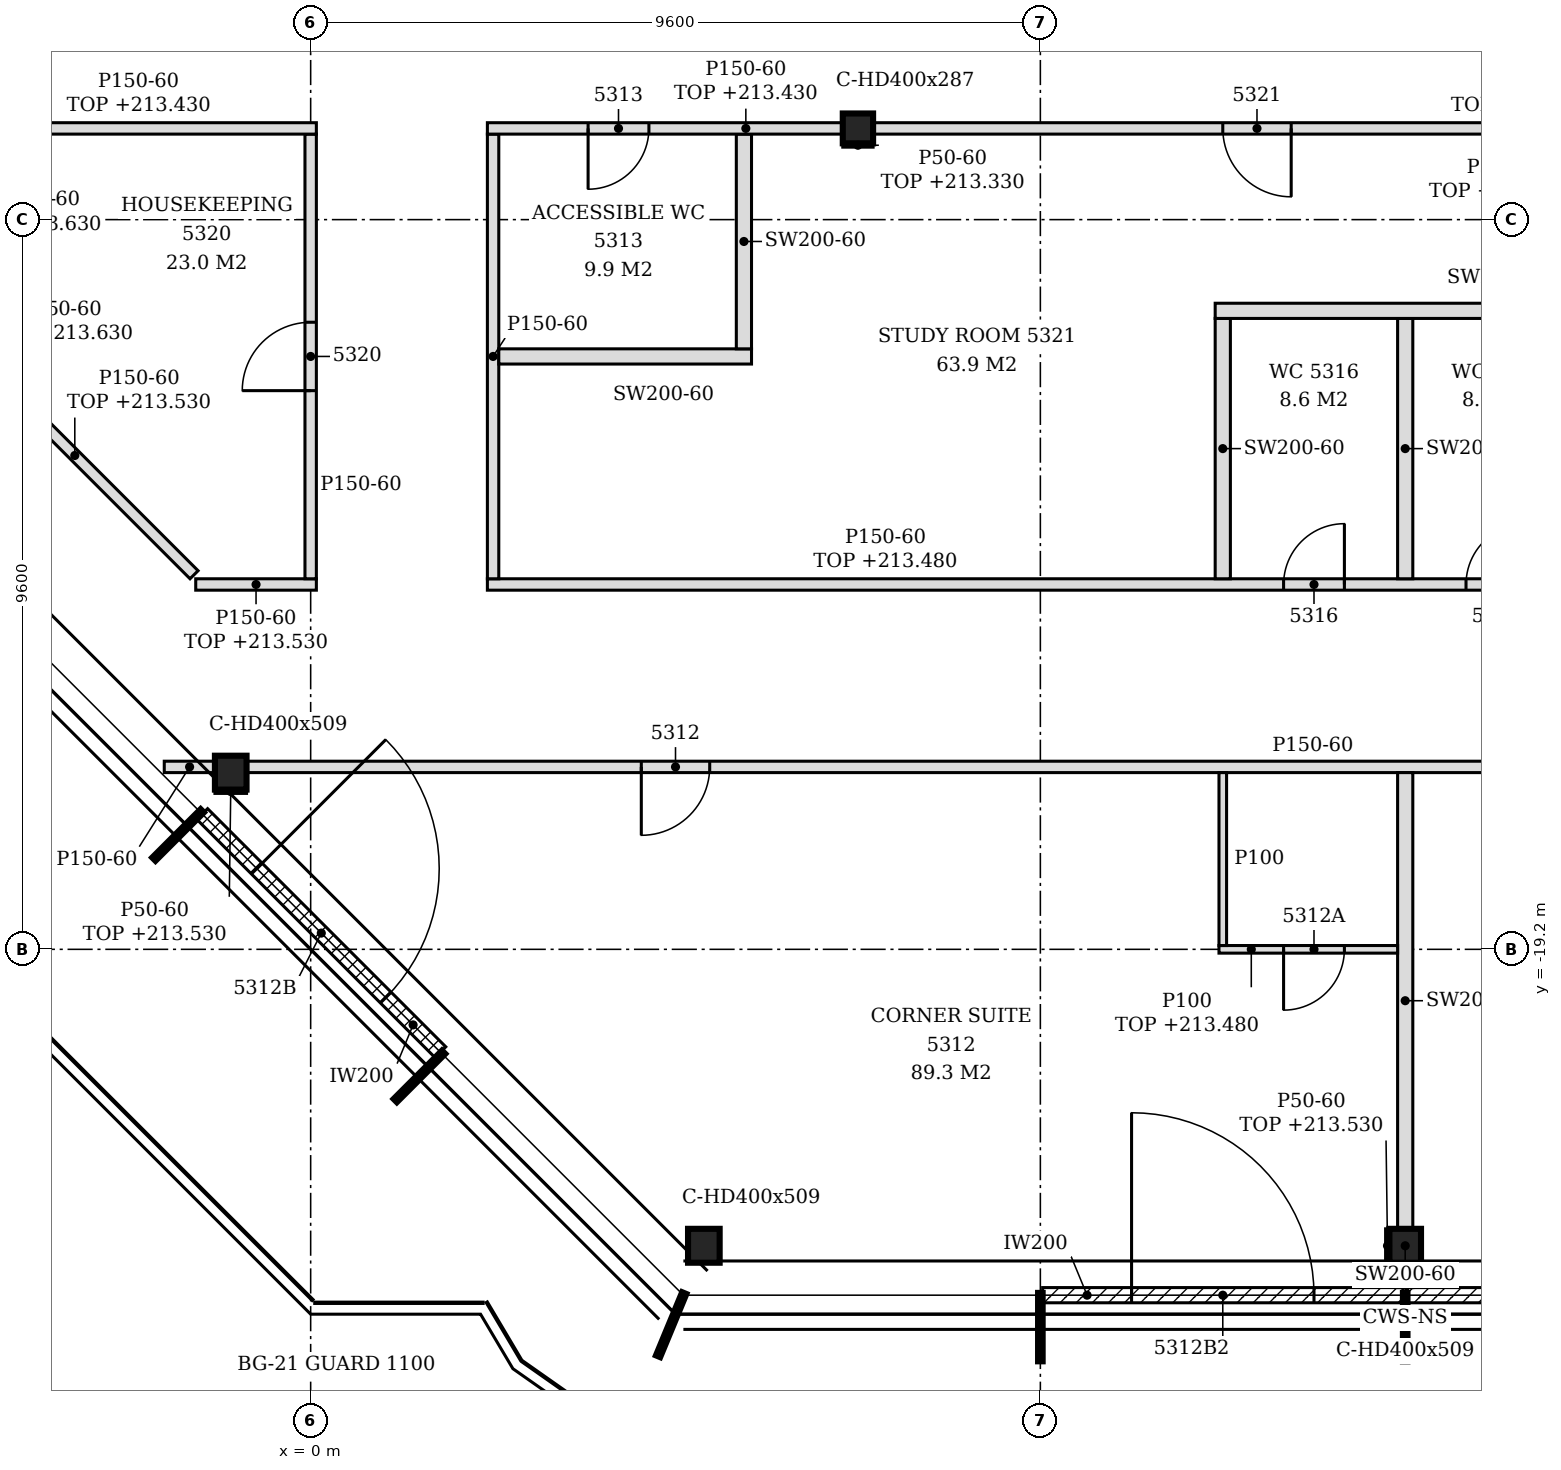
"""IFC4 building model, lengths in metres.
Left out: names, types, materials, properties, quantities, classifications, styles, units other than length and angle.
Written with IfcOpenShell. Run it as: python <this file> out.ifc"""

import sys

from ifc_helpers import new_model, si_unit, direction, frame, frame_2d, origin, origin_2d, place, context, subcontext, project, spatial, polyline, rectangle, i_section, outline, extrude, element, fill, save


model = new_model("IFC4")
c1 = context("Model", 3, precision=1e-05, world=origin(), true_north=direction((0.0, 1.0)))
c2 = subcontext(c1, "Body", "Model", "MODEL_VIEW")
j1 = project(units=[si_unit("LENGTHUNIT", "METRE"), si_unit("PLANEANGLEUNIT", "RADIAN")], contexts=[c1])
p1 = place(None, origin())
s1 = spatial("IfcSite", under=j1, at=p1, CompositionType="ELEMENT")
p2 = place(p1, origin())
s2 = spatial("IfcBuilding", under=s1, at=p2, CompositionType="ELEMENT")
p3 = place(p2, frame((0.0, 0.0, 210.6)))
s3 = spatial("IfcBuildingStorey", under=s2, at=p3, CompositionType="ELEMENT", Elevation=210.6)
for number, where, z_axis, x_axis in (
    (1, (5.173, -23.1, -0.15), (0.0, 0.0, 1.0), (1.0, 0.0, 0.0)),
    (2, (14.4, -23.1, -0.15), (0.0, 0.0, 1.0), (1.0, 0.0, 0.0)),
    (3, (-1.052, -16.876, -0.15), (0.0, 0.0, 1.0), (1.0, 0.0, 0.0)),
):
    element("IfcColumn", number, at=place(p3, frame(where, z_axis=z_axis, x_axis=x_axis)), inside=s3, PredefinedType="COLUMN", context=c2, shape_type="SweptSolid", body=[
        extrude(i_section(OverallWidth=0.416, OverallDepth=0.446, WebThickness=0.039, FlangeThickness=0.063, FilletRadius=0.015, at=origin_2d()), origin(), (0.0, 0.0, 1.0), 3.6),
    ])
p4 = place(p3, frame((7.2, -8.4, -0.15), z_axis=(0.0, 0.0, 1.0), x_axis=(1.0, 0.0, 0.0)))
e4 = element("IfcColumn", 4, at=p4, inside=s3, PredefinedType="COLUMN", context=c2, shape_type="SweptSolid", body=[
    extrude(i_section(OverallWidth=0.399, OverallDepth=0.393, WebThickness=0.023, FlangeThickness=0.037, FilletRadius=0.015, at=origin_2d()), origin(), (0.0, 0.0, 1.0), 3.6),
])
p5 = place(p3, frame((9.63, -23.75, 0.0), z_axis=(0.0, 0.0, 1.0), x_axis=(1.0, 0.0, 0.0)))
e5 = element("IfcWall", 5, at=p5, inside=s3, PredefinedType="NOTDEFINED", context=c2, shape_type="SweptSolid", body=[
    extrude(rectangle(XDim=4.74, YDim=0.2, at=frame_2d((2.37, 0.0))), origin(), (0.0, 0.0, 1.0), 3.45),
])
p6 = place(p5, frame((1.17, 0.0, 0.0)))
e6 = element("IfcOpeningElement", 6, at=p6, cuts=e5, PredefinedType="OPENING", context=c2, shape_type="SweptSolid", body=[
    extrude(rectangle(XDim=2.4, YDim=2.4, at=frame_2d((1.2, 1.2))), frame((0.0, 0.11, 0.0), z_axis=(0.0, -1.0, 0.0), x_axis=(1.0, 0.0, 0.0)), (0.0, 0.0, 1.0), 0.22),
])
p7 = place(p3, frame((14.43, -23.75, 0.0), z_axis=(0.0, 0.0, 1.0), x_axis=(1.0, 0.0, 0.0)))
e7 = element("IfcWall", 7, at=p7, inside=s3, PredefinedType="NOTDEFINED", context=c2, shape_type="SweptSolid", body=[
    extrude(rectangle(XDim=4.74, YDim=0.2, at=frame_2d((2.37, 0.0))), origin(), (0.0, 0.0, 1.0), 3.45),
])
p8 = place(p7, frame((1.17, 0.0, 0.0)))
e8 = element("IfcOpeningElement", 8, at=p8, cuts=e7, PredefinedType="OPENING", context=c2, shape_type="SweptSolid", body=[
    extrude(rectangle(XDim=2.4, YDim=2.4, at=frame_2d((1.2, 1.2))), frame((0.0, 0.11, 0.0), z_axis=(0.0, -1.0, 0.0), x_axis=(1.0, 0.0, 0.0)), (0.0, 0.0, 1.0), 0.22),
])
p9 = place(p3, frame((-1.427, -17.42, 0.0), z_axis=(0.0, 0.0, 1.0), x_axis=(0.707106781187, -0.707106781187, 0.0)))
e9 = element("IfcWall", 9, at=p9, inside=s3, PredefinedType="NOTDEFINED", context=c2, shape_type="SweptSolid", body=[
    extrude(rectangle(XDim=4.431, YDim=0.2, at=frame_2d((2.216, 0.0))), origin(), (0.0, 0.0, 1.0), 3.45),
])
p10 = place(p9, frame((1.015, 0.0, 0.0)))
e10 = element("IfcOpeningElement", 10, at=p10, cuts=e9, PredefinedType="OPENING", context=c2, shape_type="SweptSolid", body=[
    extrude(rectangle(XDim=2.4, YDim=2.4, at=frame_2d((1.2, 1.2))), frame((0.0, 0.11, 0.0), z_axis=(0.0, -1.0, 0.0), x_axis=(1.0, 0.0, 0.0)), (0.0, 0.0, 1.0), 0.22),
])
p11 = place(p3, frame((14.4, -23.65, 0.0), z_axis=(0.0, 0.0, 1.0), x_axis=(0.0, 1.0, 0.0)))
e11 = element("IfcWall", 11, at=p11, inside=s3, PredefinedType="PARTITIONING", context=c2, shape_type="SweptSolid", body=[
    extrude(rectangle(XDim=0.327, YDim=0.2, at=frame_2d((0.164, 0.0))), origin(), (0.0, 0.0, 1.0), 3.45),
])
p12 = place(p3, frame((14.4, -22.877, 0.0), z_axis=(0.0, 0.0, 1.0), x_axis=(0.0, 1.0, 0.0)))
e12 = element("IfcWall", 12, at=p12, inside=s3, PredefinedType="PARTITIONING", context=c2, shape_type="SweptSolid", body=[
    extrude(outline(polyline([(0.0, 0.0), (6.002, 0.0), (6.002, 3.45), (3.782, 3.45), (3.78, 2.88), (3.572, 2.88), (3.57, 3.45), (0.0, 3.45), (0.0, 0.0)])), frame((0.0, 0.1, 0.0), z_axis=(0.0, -1.0, 0.0), x_axis=(1.0, 0.0, 0.0)), (0.0, 0.0, 1.0), 0.2),
])
p13 = place(p3, frame((11.95, -19.2, 0.0), z_axis=(0.0, 0.0, 1.0), x_axis=(1.0, 0.0, 0.0)))
e13 = element("IfcWall", 13, at=p13, inside=s3, PredefinedType="PARTITIONING", context=c2, shape_type="SweptSolid", body=[
    extrude(rectangle(XDim=2.35, YDim=0.1, at=frame_2d((1.175, 0.0))), origin(), (0.0, 0.0, 1.0), 2.88),
])
p14 = place(p13, frame((0.85, 0.0, 0.0)))
e14 = element("IfcOpeningElement", 14, at=p14, cuts=e13, PredefinedType="OPENING", context=c2, shape_type="SweptSolid", body=[
    extrude(rectangle(XDim=0.8, YDim=2.1, at=frame_2d((0.4, 1.05))), frame((0.0, 0.06, 0.0), z_axis=(0.0, -1.0, 0.0), x_axis=(1.0, 0.0, 0.0)), (0.0, 0.0, 1.0), 0.12),
])
p15 = place(p3, frame((12.0, -19.15, 0.0), z_axis=(0.0, 0.0, 1.0), x_axis=(0.0, 1.0, 0.0)))
e15 = element("IfcWall", 15, at=p15, inside=s3, PredefinedType="PARTITIONING", context=c2, shape_type="SweptSolid", body=[
    extrude(outline(polyline([(0.0, 0.0), (2.275, 0.0), (2.275, 3.45), (0.055, 3.45), (0.053, 2.88), (0.0, 2.88), (0.0, 0.0)])), frame((0.0, 0.05, 0.0), z_axis=(0.0, -1.0, 0.0), x_axis=(1.0, 0.0, 0.0)), (0.0, 0.0, 1.0), 0.1),
])
p16 = place(p3, frame((-1.926, -16.8, 0.0), z_axis=(0.0, 0.0, 1.0), x_axis=(1.0, 0.0, 0.0)))
e16 = element("IfcWall", 16, at=p16, inside=s3, PredefinedType="PARTITIONING", context=c2, shape_type="SweptSolid", body=[
    extrude(outline(polyline([(0.0, 0.0), (0.667, 0.0), (0.667, 2.63), (0.229, 2.63), (0.227, 3.45), (0.0, 3.45), (0.0, 0.0)])), frame((0.0, 0.075, 0.0), z_axis=(0.0, -1.0, 0.0), x_axis=(1.0, 0.0, 0.0)), (0.0, 0.0, 1.0), 0.15),
])
p17 = place(p3, frame((-0.844, -16.8, 0.0), z_axis=(0.0, 0.0, 1.0), x_axis=(1.0, 0.0, 0.0)))
e17 = element("IfcWall", 17, at=p17, inside=s3, PredefinedType="PARTITIONING", context=c2, shape_type="SweptSolid", body=[
    extrude(outline(polyline([(0.0, 0.0), (21.968, 0.0), (21.968, 3.45), (20.194, 3.45), (20.191, 2.73), (19.894, 2.73), (19.892, 3.45), (8.194, 3.45), (8.191, 2.73), (7.894, 2.73), (7.892, 3.45), (0.0, 3.45), (0.0, 0.0)])), frame((0.0, 0.075, 0.0), z_axis=(0.0, -1.0, 0.0), x_axis=(1.0, 0.0, 0.0)), (0.0, 0.0, 1.0), 0.15),
])
p18 = place(p17, frame((5.194, 0.0, 0.0)))
e18 = element("IfcOpeningElement", 18, at=p18, cuts=e17, PredefinedType="OPENING", context=c2, shape_type="SweptSolid", body=[
    extrude(rectangle(XDim=0.9, YDim=2.1, at=frame_2d((0.45, 1.05))), frame((0.0, 0.085, 0.0), z_axis=(0.0, -1.0, 0.0), x_axis=(1.0, 0.0, 0.0)), (0.0, 0.0, 1.0), 0.17),
])
p19 = place(p3, frame((-1.512, -14.4, 0.0), z_axis=(0.0, 0.0, 1.0), x_axis=(1.0, 0.0, 0.0)))
e19 = element("IfcWall", 19, at=p19, inside=s3, PredefinedType="PARTITIONING", context=c2, shape_type="SweptSolid", body=[
    extrude(rectangle(XDim=1.587, YDim=0.15, at=frame_2d((0.793, 0.0))), origin(), (0.0, 0.0, 1.0), 2.93),
])
p20 = place(p3, frame((2.325, -14.4, 0.0), z_axis=(0.0, 0.0, 1.0), x_axis=(1.0, 0.0, 0.0)))
e20 = element("IfcWall", 20, at=p20, inside=s3, PredefinedType="PARTITIONING", context=c2, shape_type="SweptSolid", body=[
    extrude(outline(polyline([(0.0, 0.0), (17.804, 0.0), (17.804, 2.88), (17.025, 2.88), (17.023, 2.73), (16.725, 2.73), (16.723, 2.88), (5.025, 2.88), (5.023, 2.73), (4.725, 2.73), (4.723, 2.88), (0.0, 2.88), (0.0, 0.0)])), frame((0.0, 0.075, 0.0), z_axis=(0.0, -1.0, 0.0), x_axis=(1.0, 0.0, 0.0)), (0.0, 0.0, 1.0), 0.15),
])
p21 = place(p20, frame((15.275, 0.0, 0.0)))
e21 = element("IfcOpeningElement", 21, at=p21, cuts=e20, PredefinedType="OPENING", context=c2, shape_type="SweptSolid", body=[
    extrude(rectangle(XDim=0.8, YDim=2.1, at=frame_2d((0.4, 1.05))), frame((0.0, 0.085, 0.0), z_axis=(0.0, -1.0, 0.0), x_axis=(1.0, 0.0, 0.0)), (0.0, 0.0, 1.0), 0.17),
])
p22 = place(p20, frame((12.875, 0.0, 0.0)))
e22 = element("IfcOpeningElement", 22, at=p22, cuts=e20, PredefinedType="OPENING", context=c2, shape_type="SweptSolid", body=[
    extrude(rectangle(XDim=0.8, YDim=2.1, at=frame_2d((0.4, 1.05))), frame((0.0, 0.085, 0.0), z_axis=(0.0, -1.0, 0.0), x_axis=(1.0, 0.0, 0.0)), (0.0, 0.0, 1.0), 0.17),
])
p23 = place(p20, frame((10.475, 0.0, 0.0)))
e23 = element("IfcOpeningElement", 23, at=p23, cuts=e20, PredefinedType="OPENING", context=c2, shape_type="SweptSolid", body=[
    extrude(rectangle(XDim=0.8, YDim=2.1, at=frame_2d((0.4, 1.05))), frame((0.0, 0.085, 0.0), z_axis=(0.0, -1.0, 0.0), x_axis=(1.0, 0.0, 0.0)), (0.0, 0.0, 1.0), 0.17),
])
p24 = place(p3, frame((-1.534, -14.272, 0.0), z_axis=(0.0, 0.0, 1.0), x_axis=(-0.707134287042, 0.707079274261, 0.0)))
e24 = element("IfcWall", 24, at=p24, inside=s3, PredefinedType="PARTITIONING", context=c2, shape_type="SweptSolid", body=[
    extrude(rectangle(XDim=4.438, YDim=0.15, at=frame_2d((2.219, 0.0))), origin(), (0.0, 0.0, 1.0), 2.93),
])
p25 = place(p3, frame((0.0, -14.325, 0.0), z_axis=(0.0, 0.0, 1.0), x_axis=(0.0, 1.0, 0.0)))
e25 = element("IfcWall", 25, at=p25, inside=s3, PredefinedType="PARTITIONING", context=c2, shape_type="SweptSolid", body=[
    extrude(outline(polyline([(0.0, 0.0), (5.85, 0.0), (5.85, 2.83), (5.775, 2.83), (5.773, 3.45), (0.025, 3.45), (0.023, 2.93), (0.0, 2.93), (0.0, 0.0)])), frame((0.0, 0.075, 0.0), z_axis=(0.0, -1.0, 0.0), x_axis=(1.0, 0.0, 0.0)), (0.0, 0.0, 1.0), 0.15),
])
p26 = place(p25, frame((2.475, 0.0, 0.0)))
e26 = element("IfcOpeningElement", 26, at=p26, cuts=e25, PredefinedType="OPENING", context=c2, shape_type="SweptSolid", body=[
    extrude(rectangle(XDim=0.9, YDim=2.1, at=frame_2d((0.45, 1.05))), frame((0.0, 0.085, 0.0), z_axis=(0.0, -1.0, 0.0), x_axis=(1.0, 0.0, 0.0)), (0.0, 0.0, 1.0), 0.17),
])
p27 = place(p3, frame((2.4, -14.325, 0.0), z_axis=(0.0, 0.0, 1.0), x_axis=(0.0, 1.0, 0.0)))
e27 = element("IfcWall", 27, at=p27, inside=s3, PredefinedType="PARTITIONING", context=c2, shape_type="SweptSolid", body=[
    extrude(outline(polyline([(0.0, 0.0), (5.85, 0.0), (5.85, 2.83), (5.775, 2.83), (5.773, 3.45), (0.025, 3.45), (0.023, 2.93), (0.0, 2.93), (0.0, 0.0)])), frame((0.0, 0.075, 0.0), z_axis=(0.0, -1.0, 0.0), x_axis=(1.0, 0.0, 0.0)), (0.0, 0.0, 1.0), 0.15),
])
for number, where, z_axis, x_axis in (
    (28, (12.0, -14.325, 0.0), (0.0, 0.0, 1.0), (0.0, 1.0, 0.0)),
    (29, (14.4, -14.325, 0.0), (0.0, 0.0, 1.0), (0.0, 1.0, 0.0)),
):
    element("IfcWall", number, at=place(p3, frame(where, z_axis=z_axis, x_axis=x_axis)), inside=s3, PredefinedType="PARTITIONING", context=c2, shape_type="SweptSolid", body=[
        extrude(outline(polyline([(0.0, 0.0), (3.425, 0.0), (3.425, 3.45), (0.03, 3.45), (0.028, 2.88), (0.0, 2.88), (0.0, 0.0)])), frame((0.0, 0.1, 0.0), z_axis=(0.0, -1.0, 0.0), x_axis=(1.0, 0.0, 0.0)), (0.0, 0.0, 1.0), 0.2),
    ])
p28 = place(p3, frame((2.475, -11.4, 0.0), z_axis=(0.0, 0.0, 1.0), x_axis=(1.0, 0.0, 0.0)))
e30 = element("IfcWall", 30, at=p28, inside=s3, PredefinedType="PARTITIONING", context=c2, shape_type="SweptSolid", body=[
    extrude(rectangle(XDim=3.325, YDim=0.2, at=frame_2d((1.663, 0.0))), origin(), (0.0, 0.0, 1.0), 3.45),
])
p29 = place(p3, frame((5.7, -11.3, 0.0), z_axis=(0.0, 0.0, 1.0), x_axis=(0.0, 1.0, 0.0)))
e31 = element("IfcWall", 31, at=p29, inside=s3, PredefinedType="PARTITIONING", context=c2, shape_type="SweptSolid", body=[
    extrude(outline(polyline([(0.0, 0.0), (2.825, 0.0), (2.825, 2.83), (2.75, 2.83), (2.748, 3.45), (0.0, 3.45), (0.0, 0.0)])), frame((0.0, 0.1, 0.0), z_axis=(0.0, -1.0, 0.0), x_axis=(1.0, 0.0, 0.0)), (0.0, 0.0, 1.0), 0.2),
])
p30 = place(p3, frame((11.9, -10.8, 0.0), z_axis=(0.0, 0.0, 1.0), x_axis=(1.0, 0.0, 0.0)))
e32 = element("IfcWall", 32, at=p30, inside=s3, PredefinedType="PARTITIONING", context=c2, shape_type="SweptSolid", body=[
    extrude(outline(polyline([(0.0, 0.0), (7.2, 0.0), (7.2, 2.73), (7.15, 2.73), (7.148, 3.45), (0.0, 3.45), (0.0, 0.0)])), frame((0.0, 0.1, 0.0), z_axis=(0.0, -1.0, 0.0), x_axis=(1.0, 0.0, 0.0)), (0.0, 0.0, 1.0), 0.2),
])
p31 = place(p3, frame((-4.601, -8.4, 0.0), z_axis=(0.0, 0.0, 1.0), x_axis=(1.0, 0.0, 0.0)))
e33 = element("IfcWall", 33, at=p31, inside=s3, PredefinedType="PARTITIONING", context=c2, shape_type="SweptSolid", body=[
    extrude(rectangle(XDim=4.676, YDim=0.15, at=frame_2d((2.338, 0.0))), origin(), (0.0, 0.0, 1.0), 2.83),
])
p32 = place(p3, frame((2.325, -8.4, 0.0), z_axis=(0.0, 0.0, 1.0), x_axis=(1.0, 0.0, 0.0)))
e34 = element("IfcWall", 34, at=p32, inside=s3, PredefinedType="PARTITIONING", context=c2, shape_type="SweptSolid", body=[
    extrude(rectangle(XDim=4.676, YDim=0.15, at=frame_2d((2.338, 0.0))), origin(), (0.0, 0.0, 1.0), 2.83),
])
p33 = place(p32, frame((1.325, 0.0, 0.0)))
e35 = element("IfcOpeningElement", 35, at=p33, cuts=e34, PredefinedType="OPENING", context=c2, shape_type="SweptSolid", body=[
    extrude(rectangle(XDim=0.8, YDim=2.1, at=frame_2d((0.4, 1.05))), frame((0.0, 0.085, 0.0), z_axis=(0.0, -1.0, 0.0), x_axis=(1.0, 0.0, 0.0)), (0.0, 0.0, 1.0), 0.17),
])
p34 = place(p3, frame((7.399, -8.4, 0.0), z_axis=(0.0, 0.0, 1.0), x_axis=(1.0, 0.0, 0.0)))
e36 = element("IfcWall", 36, at=p34, inside=s3, PredefinedType="PARTITIONING", context=c2, shape_type="SweptSolid", body=[
    extrude(rectangle(XDim=11.601, YDim=0.15, at=frame_2d((5.801, 0.0))), origin(), (0.0, 0.0, 1.0), 2.83),
])
p35 = place(p34, frame((4.601, 0.0, 0.0)))
e37 = element("IfcOpeningElement", 37, at=p35, cuts=e36, PredefinedType="OPENING", context=c2, shape_type="SweptSolid", body=[
    extrude(rectangle(XDim=0.9, YDim=2.1, at=frame_2d((0.45, 1.05))), frame((0.0, 0.085, 0.0), z_axis=(0.0, -1.0, 0.0), x_axis=(1.0, 0.0, 0.0)), (0.0, 0.0, 1.0), 0.17),
])
p36 = place(p3, frame((14.167, -23.323, 0.0), z_axis=(0.0, 0.0, 1.0), x_axis=(0.0, 1.0, 0.0)))
e38 = element("IfcWall", 38, at=p36, inside=s3, PredefinedType="PARTITIONING", context=c2, shape_type="SweptSolid", body=[
    extrude(rectangle(XDim=0.446, YDim=0.05, at=frame_2d((0.223, 0.0))), origin(), (0.0, 0.0, 1.0), 2.93),
])
p37 = place(p3, frame((-1.26, -17.124, 0.0), z_axis=(0.0, 0.0, 1.0), x_axis=(1.0, 0.0, 0.0)))
e39 = element("IfcWall", 39, at=p37, inside=s3, PredefinedType="PARTITIONING", context=c2, shape_type="SweptSolid", body=[
    extrude(rectangle(XDim=0.416, YDim=0.05, at=frame_2d((0.208, 0.0))), origin(), (0.0, 0.0, 1.0), 2.93),
])
p38 = place(p3, frame((7.0, -8.622, 0.0), z_axis=(0.0, 0.0, 1.0), x_axis=(1.0, 0.0, 0.0)))
e40 = element("IfcWall", 40, at=p38, inside=s3, PredefinedType="PARTITIONING", context=c2, shape_type="SweptSolid", body=[
    extrude(rectangle(XDim=0.399, YDim=0.05, at=frame_2d((0.199, 0.0))), origin(), (0.0, 0.0, 1.0), 2.73),
])
p39 = place(p6, origin())
e41 = element("IfcDoor", 41, at=p39, inside=s3, OperationType="SINGLE_SWING_LEFT", PredefinedType="DOOR", context=c2, shape_type="SweptSolid", body=[
    extrude(rectangle(XDim=2.4, YDim=2.4, at=frame_2d((1.2, 1.2))), frame((0.0, 0.025, 0.0), z_axis=(0.0, -1.0, 0.0), x_axis=(1.0, 0.0, 0.0)), (0.0, 0.0, 1.0), 0.05),
])
fill(e6, e41)
p40 = place(p10, origin())
e42 = element("IfcDoor", 42, at=p40, inside=s3, OperationType="SINGLE_SWING_LEFT", PredefinedType="DOOR", context=c2, shape_type="SweptSolid", body=[
    extrude(rectangle(XDim=2.4, YDim=2.4, at=frame_2d((1.2, 1.2))), frame((0.0, 0.025, 0.0), z_axis=(0.0, -1.0, 0.0), x_axis=(1.0, 0.0, 0.0)), (0.0, 0.0, 1.0), 0.05),
])
fill(e10, e42)
p41 = place(p18, frame((0.9, 0.0, 0.0), z_axis=(0.0, 0.0, 1.0), x_axis=(-1.0, 0.0, 0.0)))
e43 = element("IfcDoor", 43, at=p41, inside=s3, OperationType="SINGLE_SWING_RIGHT", PredefinedType="DOOR", context=c2, shape_type="SweptSolid", body=[
    extrude(rectangle(XDim=0.9, YDim=2.1, at=frame_2d((0.45, 1.05))), frame((0.0, 0.025, 0.0), z_axis=(0.0, -1.0, 0.0), x_axis=(1.0, 0.0, 0.0)), (0.0, 0.0, 1.0), 0.05),
])
fill(e18, e43)
p42 = place(p14, frame((0.8, 0.0, 0.0), z_axis=(0.0, 0.0, 1.0), x_axis=(-1.0, 0.0, 0.0)))
e44 = element("IfcDoor", 44, at=p42, inside=s3, OperationType="SINGLE_SWING_RIGHT", PredefinedType="DOOR", context=c2, shape_type="SweptSolid", body=[
    extrude(rectangle(XDim=0.8, YDim=2.1, at=frame_2d((0.4, 1.05))), frame((0.0, 0.025, 0.0), z_axis=(0.0, -1.0, 0.0), x_axis=(1.0, 0.0, 0.0)), (0.0, 0.0, 1.0), 0.05),
])
fill(e14, e44)
p43 = place(p33, frame((0.8, 0.0, 0.0), z_axis=(0.0, 0.0, 1.0), x_axis=(-1.0, 0.0, 0.0)))
e45 = element("IfcDoor", 45, at=p43, inside=s3, OperationType="SINGLE_SWING_RIGHT", PredefinedType="DOOR", context=c2, shape_type="SweptSolid", body=[
    extrude(rectangle(XDim=0.8, YDim=2.1, at=frame_2d((0.4, 1.05))), frame((0.0, 0.025, 0.0), z_axis=(0.0, -1.0, 0.0), x_axis=(1.0, 0.0, 0.0)), (0.0, 0.0, 1.0), 0.05),
])
fill(e35, e45)
p44 = place(p22, origin())
e46 = element("IfcDoor", 46, at=p44, inside=s3, OperationType="SINGLE_SWING_RIGHT", PredefinedType="DOOR", context=c2, shape_type="SweptSolid", body=[
    extrude(rectangle(XDim=0.8, YDim=2.1, at=frame_2d((0.4, 1.05))), frame((0.0, 0.025, 0.0), z_axis=(0.0, -1.0, 0.0), x_axis=(1.0, 0.0, 0.0)), (0.0, 0.0, 1.0), 0.05),
])
fill(e22, e46)
p45 = place(p23, origin())
e47 = element("IfcDoor", 47, at=p45, inside=s3, OperationType="SINGLE_SWING_RIGHT", PredefinedType="DOOR", context=c2, shape_type="SweptSolid", body=[
    extrude(rectangle(XDim=0.8, YDim=2.1, at=frame_2d((0.4, 1.05))), frame((0.0, 0.025, 0.0), z_axis=(0.0, -1.0, 0.0), x_axis=(1.0, 0.0, 0.0)), (0.0, 0.0, 1.0), 0.05),
])
fill(e23, e47)
p46 = place(p26, origin())
e48 = element("IfcDoor", 48, at=p46, inside=s3, OperationType="SINGLE_SWING_LEFT", PredefinedType="DOOR", context=c2, shape_type="SweptSolid", body=[
    extrude(rectangle(XDim=0.9, YDim=2.1, at=frame_2d((0.45, 1.05))), frame((0.0, 0.025, 0.0), z_axis=(0.0, -1.0, 0.0), x_axis=(1.0, 0.0, 0.0)), (0.0, 0.0, 1.0), 0.05),
])
fill(e26, e48)
p47 = place(p35, frame((0.9, 0.0, 0.0), z_axis=(0.0, 0.0, 1.0), x_axis=(-1.0, 0.0, 0.0)))
e49 = element("IfcDoor", 49, at=p47, inside=s3, OperationType="SINGLE_SWING_LEFT", PredefinedType="DOOR", context=c2, shape_type="SweptSolid", body=[
    extrude(rectangle(XDim=0.9, YDim=2.1, at=frame_2d((0.45, 1.05))), frame((0.0, 0.025, 0.0), z_axis=(0.0, -1.0, 0.0), x_axis=(1.0, 0.0, 0.0)), (0.0, 0.0, 1.0), 0.05),
])
fill(e37, e49)
save(model, sys.argv[1])
